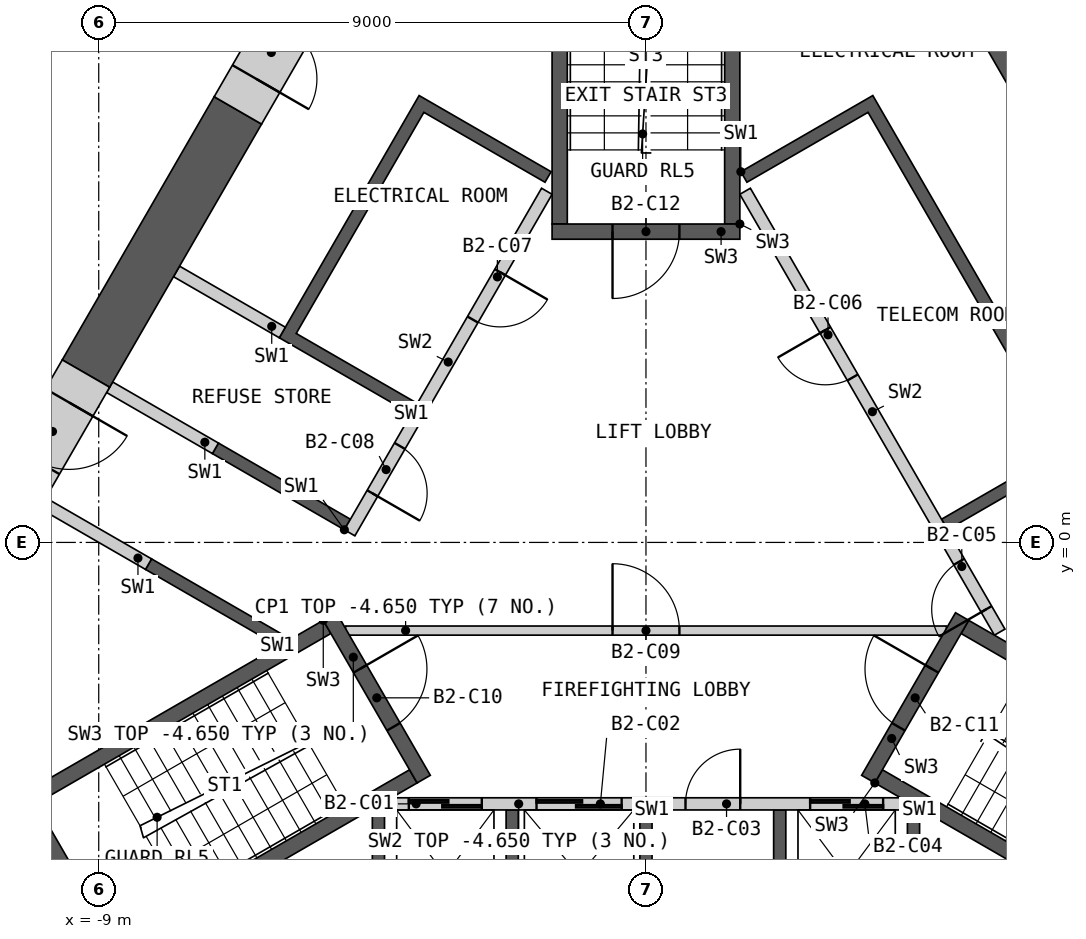
"""IFC4 building model, lengths in metres.
Left out: names, types, materials, properties, quantities, classifications, styles, units other than length and angle.
Written with IfcOpenShell. Run it as: python <this file> out.ifc"""

import sys

from ifc_helpers import new_model, si_unit, direction, frame, frame_2d, origin, place, context, subcontext, project, spatial, polyline, rectangle, outline, extrude, element, fill, save


model = new_model("IFC4")
c1 = context("Model", 3, precision=1e-05, world=origin(), true_north=direction((0.0, 1.0)))
c2 = subcontext(c1, "Body", "Model", "MODEL_VIEW")
j1 = project(units=[si_unit("LENGTHUNIT", "METRE"), si_unit("PLANEANGLEUNIT", "RADIAN")], contexts=[c1])
p1 = place(None, origin())
s1 = spatial("IfcSite", under=j1, at=p1, CompositionType="ELEMENT")
p2 = place(p1, origin())
s2 = spatial("IfcBuilding", under=s1, at=p2, CompositionType="ELEMENT")
p3 = place(p2, frame((0.0, 0.0, -8.4)))
s3 = spatial("IfcBuildingStorey", under=s2, at=p3, CompositionType="ELEMENT", Elevation=-8.4)
p4 = place(p3, frame((-6.74, 32.759, 0.0), z_axis=(0.0, 0.0, 1.0), x_axis=(-0.500000005698, -0.866025400495, 0.0)))
e1 = element("IfcWall", 1, at=p4, inside=s3, PredefinedType="SOLIDWALL", context=c2, shape_type="SweptSolid", body=[
    extrude(rectangle(XDim=50.0, YDim=0.6, at=frame_2d((25.0, 0.0))), origin(), (0.0, 0.0, 1.0), 3.75),
])
p5 = place(p3, origin())
e2 = element("IfcWall", 2, at=p5, inside=s3, PredefinedType="SHEAR", context=c2, shape_type="SweptSolid", body=[
    extrude(outline(polyline([(4.5, -4.4), (4.5, -6.906), (2.1, -6.906), (2.1, -4.4), (2.3, -4.4), (2.3, -6.7), (4.3, -6.7), (4.3, -4.4), (4.5, -4.4)])), origin(), (0.0, 0.0, 1.0), 3.75),
])
p6 = place(p3, origin())
e3 = element("IfcWall", 3, at=p6, inside=s3, PredefinedType="SHEAR", context=c2, shape_type="SweptSolid", body=[
    extrude(outline(polyline([(0.1, -4.4), (0.1, -6.906), (-4.5, -6.906), (-4.5, -4.4), (-4.3, -4.4), (-4.3, -6.7), (-2.3, -6.7), (-2.3, -4.4), (-2.1, -4.4), (-2.1, -6.7), (-0.1, -6.7), (-0.1, -4.4), (0.1, -4.4)])), origin(), (0.0, 0.0, 1.0), 3.75),
])
p7 = place(p3, frame((-4.187, -4.3, 0.0), z_axis=(0.0, 0.0, 1.0), x_axis=(1.0, 0.0, 0.0)))
e4 = element("IfcWall", 4, at=p7, inside=s3, PredefinedType="SOLIDWALL", context=c2, shape_type="SweptSolid", body=[
    extrude(rectangle(XDim=8.373, YDim=0.2, at=frame_2d((4.187, 0.0))), origin(), (0.0, 0.0, 1.0), 3.75),
])
p8 = place(p7, frame((0.287, 0.0, 0.0)))
e5 = element("IfcOpeningElement", 5, at=p8, cuts=e4, PredefinedType="OPENING", context=c2, shape_type="SweptSolid", body=[
    extrude(rectangle(XDim=1.2, YDim=2.1, at=frame_2d((0.6, 1.05))), frame((0.0, 0.11, 0.0), z_axis=(0.0, -1.0, 0.0), x_axis=(1.0, 0.0, 0.0)), (0.0, 0.0, 1.0), 0.22),
])
p9 = place(p7, frame((2.387, 0.0, 0.0)))
e6 = element("IfcOpeningElement", 6, at=p9, cuts=e4, PredefinedType="OPENING", context=c2, shape_type="SweptSolid", body=[
    extrude(rectangle(XDim=1.4, YDim=2.1, at=frame_2d((0.7, 1.05))), frame((0.0, 0.11, 0.0), z_axis=(0.0, -1.0, 0.0), x_axis=(1.0, 0.0, 0.0)), (0.0, 0.0, 1.0), 0.22),
])
p10 = place(p7, frame((4.837, 0.0, 0.0)))
e7 = element("IfcOpeningElement", 7, at=p10, cuts=e4, PredefinedType="OPENING", context=c2, shape_type="SweptSolid", body=[
    extrude(rectangle(XDim=0.9, YDim=2.1, at=frame_2d((0.45, 1.05))), frame((0.0, 0.11, 0.0), z_axis=(0.0, -1.0, 0.0), x_axis=(1.0, 0.0, 0.0)), (0.0, 0.0, 1.0), 0.22),
])
p11 = place(p7, frame((6.887, 0.0, 0.0)))
e8 = element("IfcOpeningElement", 8, at=p11, cuts=e4, PredefinedType="OPENING", context=c2, shape_type="SweptSolid", body=[
    extrude(rectangle(XDim=1.2, YDim=2.1, at=frame_2d((0.6, 1.05))), frame((0.0, 0.11, 0.0), z_axis=(0.0, -1.0, 0.0), x_axis=(1.0, 0.0, 0.0)), (0.0, 0.0, 1.0), 0.22),
])
p12 = place(p3, origin())
e9 = element("IfcWall", 9, at=p12, inside=s3, PredefinedType="SHEAR", context=c2, shape_type="SweptSolid", body=[
    extrude(outline(polyline([(1.561, 6.097), (3.731, 7.35), (7.131, 1.461), (4.96, 0.208), (4.861, 0.381), (6.852, 1.531), (3.652, 7.074), (1.66, 5.924), (1.561, 6.097)])), origin(), (0.0, 0.0, 1.0), 3.75),
])
p13 = place(p3, frame((5.817, -1.476, 0.0), z_axis=(0.0, 0.0, 1.0), x_axis=(-0.500002616675, 0.866023893041, 0.0)))
e10 = element("IfcWall", 10, at=p13, inside=s3, PredefinedType="SOLIDWALL", context=c2, shape_type="SweptSolid", body=[
    extrude(rectangle(XDim=8.373, YDim=0.2, at=frame_2d((4.187, 0.0))), origin(), (0.0, 0.0, 1.0), 3.75),
])
p14 = place(p13, frame((0.437, 0.0, 0.0)))
e11 = element("IfcOpeningElement", 11, at=p14, cuts=e10, PredefinedType="OPENING", context=c2, shape_type="SweptSolid", body=[
    extrude(rectangle(XDim=0.9, YDim=2.1, at=frame_2d((0.45, 1.05))), frame((0.0, 0.11, 0.0), z_axis=(0.0, -1.0, 0.0), x_axis=(1.0, 0.0, 0.0)), (0.0, 0.0, 1.0), 0.22),
])
p15 = place(p13, frame((4.837, 0.0, 0.0)))
e12 = element("IfcOpeningElement", 12, at=p15, cuts=e10, PredefinedType="OPENING", context=c2, shape_type="SweptSolid", body=[
    extrude(rectangle(XDim=0.9, YDim=2.1, at=frame_2d((0.45, 1.05))), frame((0.0, 0.11, 0.0), z_axis=(0.0, -1.0, 0.0), x_axis=(1.0, 0.0, 0.0)), (0.0, 0.0, 1.0), 0.22),
])
p16 = place(p3, origin())
e13 = element("IfcWall", 13, at=p16, inside=s3, PredefinedType="SHEAR", context=c2, shape_type="SweptSolid", body=[
    extrude(outline(polyline([(-6.061, -1.697), (-8.231, -0.444), (-8.131, -0.271), (-5.96, -1.524), (-6.061, -1.697)])), origin(), (0.0, 0.0, 1.0), 3.75),
])
p17 = place(p3, origin())
e14 = element("IfcWall", 14, at=p17, inside=s3, PredefinedType="SHEAR", context=c2, shape_type="SweptSolid", body=[
    extrude(outline(polyline([(-4.96, 0.208), (-7.131, 1.461), (-7.031, 1.634), (-4.861, 0.381), (-4.96, 0.208)])), origin(), (0.0, 0.0, 1.0), 3.75),
])
p18 = place(p3, origin())
e15 = element("IfcWall", 15, at=p18, inside=s3, PredefinedType="SHEAR", context=c2, shape_type="SweptSolid", body=[
    extrude(outline(polyline([(-3.861, 2.113), (-6.031, 3.366), (-3.731, 7.35), (-1.561, 6.097), (-1.66, 5.924), (-3.652, 7.074), (-5.752, 3.437), (-3.76, 2.287), (-3.861, 2.113)])), origin(), (0.0, 0.0, 1.0), 3.75),
])
p19 = place(p3, frame((-1.631, 5.776, 0.0), z_axis=(0.0, 0.0, 1.0), x_axis=(-0.499992876559, -0.866029516466, 0.0)))
e16 = element("IfcWall", 16, at=p19, inside=s3, PredefinedType="SOLIDWALL", context=c2, shape_type="SweptSolid", body=[
    extrude(rectangle(XDim=6.486, YDim=0.2, at=frame_2d((3.243, 0.0))), origin(), (0.0, 0.0, 1.0), 3.75),
])
p20 = place(p19, frame((1.537, 0.0, 0.0)))
e17 = element("IfcOpeningElement", 17, at=p20, cuts=e16, PredefinedType="OPENING", context=c2, shape_type="SweptSolid", body=[
    extrude(rectangle(XDim=0.9, YDim=2.1, at=frame_2d((0.45, 1.05))), frame((0.0, 0.11, 0.0), z_axis=(0.0, -1.0, 0.0), x_axis=(1.0, 0.0, 0.0)), (0.0, 0.0, 1.0), 0.22),
])
p21 = place(p19, frame((4.837, 0.0, 0.0)))
e18 = element("IfcOpeningElement", 18, at=p21, cuts=e16, PredefinedType="OPENING", context=c2, shape_type="SweptSolid", body=[
    extrude(rectangle(XDim=0.9, YDim=2.1, at=frame_2d((0.45, 1.05))), frame((0.0, 0.11, 0.0), z_axis=(0.0, -1.0, 0.0), x_axis=(1.0, 0.0, 0.0)), (0.0, 0.0, 1.0), 0.22),
])
p22 = place(p3, frame((-5.981, 3.453, 0.0), z_axis=(0.0, 0.0, 1.0), x_axis=(-0.866013584312, 0.500020471368, 0.0)))
e19 = element("IfcWall", 19, at=p22, inside=s3, PredefinedType="SHEAR", context=c2, shape_type="SweptSolid", body=[
    extrude(rectangle(XDim=2.009, YDim=0.2, at=frame_2d((1.005, 0.0))), origin(), (0.0, 0.0, 1.0), 3.75),
])
p23 = place(p3, frame((-7.081, 1.548, 0.0), z_axis=(0.0, 0.0, 1.0), x_axis=(-0.865983199114, 0.50007309351, 0.0)))
e20 = element("IfcWall", 20, at=p23, inside=s3, PredefinedType="SHEAR", context=c2, shape_type="SweptSolid", body=[
    extrude(rectangle(XDim=2.009, YDim=0.2, at=frame_2d((1.004, 0.0))), origin(), (0.0, 0.0, 1.0), 3.75),
])
p24 = place(p3, frame((-8.181, -0.357, 0.0), z_axis=(0.0, 0.0, 1.0), x_axis=(-0.866035824272, 0.499981950752, 0.0)))
e21 = element("IfcWall", 21, at=p24, inside=s3, PredefinedType="SHEAR", context=c2, shape_type="SweptSolid", body=[
    extrude(rectangle(XDim=2.009, YDim=0.2, at=frame_2d((1.004, 0.0))), origin(), (0.0, 0.0, 1.0), 3.75),
])
p25 = place(p3, frame((-4.941, -1.45, 0.0), z_axis=(0.0, 0.0, 1.0), x_axis=(1.0, 0.0, 0.0)))
e22 = element("IfcWall", 22, at=p25, inside=s3, PredefinedType="PARTITIONING", context=c2, shape_type="SweptSolid", body=[
    extrude(rectangle(XDim=9.882, YDim=0.15, at=frame_2d((4.941, 0.0))), origin(), (0.0, 0.0, 1.0), 3.75),
])
p26 = place(p25, frame((4.391, 0.0, 0.0)))
e23 = element("IfcOpeningElement", 23, at=p26, cuts=e22, PredefinedType="OPENING", context=c2, shape_type="SweptSolid", body=[
    extrude(rectangle(XDim=1.1, YDim=2.1, at=frame_2d((0.55, 1.05))), frame((0.0, 0.085, 0.0), z_axis=(0.0, -1.0, 0.0), x_axis=(1.0, 0.0, 0.0)), (0.0, 0.0, 1.0), 0.17),
])
p27 = place(p3, origin())
e24 = element("IfcWall", 24, at=p27, inside=s3, PredefinedType="SHEAR", context=c2, shape_type="SweptSolid", body=[
    extrude(outline(polyline([(-5.307, -1.281), (-10.374, -4.206), (-10.032, -4.298), (-5.182, -1.498), (-5.307, -1.281)])), origin(), (0.0, 0.0, 1.0), 3.75),
])
p28 = place(p3, origin())
e25 = element("IfcWall", 25, at=p28, inside=s3, PredefinedType="SHEAR", context=c2, shape_type="SweptSolid", body=[
    extrude(outline(polyline([(-10.374, -4.206), (-8.83, -6.881), (-8.738, -6.539), (-10.032, -4.298), (-10.374, -4.206)])), origin(), (0.0, 0.0, 1.0), 3.75),
])
p29 = place(p3, origin())
e26 = element("IfcWall", 26, at=p29, inside=s3, PredefinedType="SHEAR", context=c2, shape_type="SweptSolid", body=[
    extrude(outline(polyline([(-8.738, -6.539), (-8.83, -6.881), (-3.763, -3.956), (-3.888, -3.739), (-8.738, -6.539)])), origin(), (0.0, 0.0, 1.0), 3.75),
])
p30 = place(p3, frame((-5.199, -1.219, 0.0), z_axis=(0.0, 0.0, 1.0), x_axis=(0.499982516597, -0.866035497597, 0.0)))
e27 = element("IfcWall", 27, at=p30, inside=s3, PredefinedType="SHEAR", context=c2, shape_type="SweptSolid", body=[
    extrude(rectangle(XDim=3.088, YDim=0.25, at=frame_2d((1.544, 0.0))), origin(), (0.0, 0.0, 1.0), 3.75),
])
p31 = place(p30, frame((0.994, 0.0, 0.0)))
e28 = element("IfcOpeningElement", 28, at=p31, cuts=e27, PredefinedType="OPENING", context=c2, shape_type="SweptSolid", body=[
    extrude(rectangle(XDim=1.1, YDim=2.1, at=frame_2d((0.55, 1.05))), frame((0.0, 0.135, 0.0), z_axis=(0.0, -1.0, 0.0), x_axis=(1.0, 0.0, 0.0)), (0.0, 0.0, 1.0), 0.27),
])
p32 = place(p3, origin())
e29 = element("IfcWall", 29, at=p32, inside=s3, PredefinedType="SHEAR", context=c2, shape_type="SweptSolid", body=[
    extrude(outline(polyline([(3.763, -3.956), (8.83, -6.881), (8.738, -6.539), (3.888, -3.739), (3.763, -3.956)])), origin(), (0.0, 0.0, 1.0), 3.75),
])
p33 = place(p3, origin())
e30 = element("IfcWall", 30, at=p33, inside=s3, PredefinedType="SHEAR", context=c2, shape_type="SweptSolid", body=[
    extrude(outline(polyline([(10.032, -4.298), (10.374, -4.206), (5.307, -1.281), (5.182, -1.498), (10.032, -4.298)])), origin(), (0.0, 0.0, 1.0), 3.75),
])
p34 = place(p3, frame((3.655, -3.893, 0.0), z_axis=(0.0, 0.0, 1.0), x_axis=(0.499982516597, 0.866035497597, 0.0)))
e31 = element("IfcWall", 31, at=p34, inside=s3, PredefinedType="SHEAR", context=c2, shape_type="SweptSolid", body=[
    extrude(rectangle(XDim=3.088, YDim=0.25, at=frame_2d((1.544, 0.0))), origin(), (0.0, 0.0, 1.0), 3.75),
])
p35 = place(p34, frame((0.994, 0.0, 0.0)))
e32 = element("IfcOpeningElement", 32, at=p35, cuts=e31, PredefinedType="OPENING", context=c2, shape_type="SweptSolid", body=[
    extrude(rectangle(XDim=1.1, YDim=2.1, at=frame_2d((0.55, 1.05))), frame((0.0, 0.135, 0.0), z_axis=(0.0, -1.0, 0.0), x_axis=(1.0, 0.0, 0.0)), (0.0, 0.0, 1.0), 0.27),
])
p36 = place(p3, origin())
e33 = element("IfcWall", 33, at=p36, inside=s3, PredefinedType="SHEAR", context=c2, shape_type="SweptSolid", body=[
    extrude(outline(polyline([(1.544, 5.237), (1.544, 11.087), (1.294, 10.837), (1.294, 5.237), (1.544, 5.237)])), origin(), (0.0, 0.0, 1.0), 3.75),
])
p37 = place(p3, origin())
e34 = element("IfcWall", 34, at=p37, inside=s3, PredefinedType="SHEAR", context=c2, shape_type="SweptSolid", body=[
    extrude(outline(polyline([(-1.294, 10.837), (-1.544, 11.087), (-1.544, 5.237), (-1.294, 5.237), (-1.294, 10.837)])), origin(), (0.0, 0.0, 1.0), 3.75),
])
p38 = place(p3, frame((1.544, 5.112, 0.0), z_axis=(0.0, 0.0, 1.0), x_axis=(-1.0, 0.0, 0.0)))
e35 = element("IfcWall", 35, at=p38, inside=s3, PredefinedType="SHEAR", context=c2, shape_type="SweptSolid", body=[
    extrude(rectangle(XDim=3.088, YDim=0.25, at=frame_2d((1.544, 0.0))), origin(), (0.0, 0.0, 1.0), 3.75),
])
p39 = place(p38, frame((0.994, 0.0, 0.0)))
e36 = element("IfcOpeningElement", 36, at=p39, cuts=e35, PredefinedType="OPENING", context=c2, shape_type="SweptSolid", body=[
    extrude(rectangle(XDim=1.1, YDim=2.1, at=frame_2d((0.55, 1.05))), frame((0.0, 0.135, 0.0), z_axis=(0.0, -1.0, 0.0), x_axis=(1.0, 0.0, 0.0)), (0.0, 0.0, 1.0), 0.27),
])
p40 = place(p3, frame((6.436, 7.582, 0.0), z_axis=(0.0, 0.0, 1.0), x_axis=(-0.500003364394, 0.866023461342, 0.0)))
e37 = element("IfcWall", 37, at=p40, inside=s3, PredefinedType="SHEAR", context=c2, shape_type="SweptSolid", body=[
    extrude(rectangle(XDim=6.646, YDim=0.9, at=frame_2d((3.323, 0.0))), origin(), (0.0, 0.0, 1.0), 3.75),
])
p41 = place(p3, frame((-6.711, 7.105, 0.0), z_axis=(0.0, 0.0, 1.0), x_axis=(-0.499969117767, -0.866043232916, 0.0)))
e38 = element("IfcWall", 38, at=p41, inside=s3, PredefinedType="SHEAR", context=c2, shape_type="SweptSolid", body=[
    extrude(rectangle(XDim=4.998, YDim=0.9, at=frame_2d((2.499, 0.0))), origin(), (0.0, 0.0, 1.0), 3.75),
])
p42 = place(p3, frame((-5.611, 9.011, 0.0), z_axis=(0.0, 0.0, 1.0), x_axis=(-0.50002983664, -0.866008176907, 0.0)))
e39 = element("IfcWall", 39, at=p42, inside=s3, PredefinedType="SHEAR", context=c2, shape_type="SweptSolid", body=[
    extrude(rectangle(XDim=2.2, YDim=0.9, at=frame_2d((1.1, 0.0))), origin(), (0.0, 0.0, 1.0), 3.75),
])
p43 = place(p42, frame((0.6, 0.0, 0.0)))
e40 = element("IfcOpeningElement", 40, at=p43, cuts=e39, PredefinedType="OPENING", context=c2, shape_type="SweptSolid", body=[
    extrude(rectangle(XDim=1.0, YDim=2.1, at=frame_2d((0.5, 1.05))), frame((0.0, 0.46, 0.0), z_axis=(0.0, -1.0, 0.0), x_axis=(1.0, 0.0, 0.0)), (0.0, 0.0, 1.0), 0.92),
])
p44 = place(p3, frame((-9.21, 2.777, 0.0), z_axis=(0.0, 0.0, 1.0), x_axis=(-0.500077893725, -0.86598042715, 0.0)))
e41 = element("IfcWall", 41, at=p44, inside=s3, PredefinedType="SHEAR", context=c2, shape_type="SweptSolid", body=[
    extrude(rectangle(XDim=2.2, YDim=0.9, at=frame_2d((1.1, 0.0))), origin(), (0.0, 0.0, 1.0), 3.75),
])
p45 = place(p44, frame((0.55, 0.0, 0.0)))
e42 = element("IfcOpeningElement", 42, at=p45, cuts=e41, PredefinedType="OPENING", context=c2, shape_type="SweptSolid", body=[
    extrude(rectangle(XDim=1.1, YDim=2.1, at=frame_2d((0.55, 1.05))), frame((0.0, 0.46, 0.0), z_axis=(0.0, -1.0, 0.0), x_axis=(1.0, 0.0, 0.0)), (0.0, 0.0, 1.0), 0.92),
])
p46 = place(p3, frame((-2.817, 24.72, 0.0), z_axis=(0.0, 0.0, 1.0), x_axis=(-0.500000572924, -0.866025073006, 0.0)))
e43 = element("IfcWall", 43, at=p46, inside=s3, PredefinedType="SHEAR", context=c2, shape_type="SweptSolid", body=[
    extrude(outline(polyline([(0.0, 0.0), (22.467, 0.0), (22.467, 0.3), (3.0, 3.549), (3.0, 3.544), (0.0, 3.799), (0.0, 0.0)])), frame((0.0, 0.15, 0.0), z_axis=(0.0, -1.0, 0.0), x_axis=(1.0, 0.0, 0.0)), (0.0, 0.0, 1.0), 0.3),
])
p47 = place(p3, frame((-7.753, 27.571, 0.0), z_axis=(0.0, 0.0, 1.0), x_axis=(-0.500004017478, -0.86602308428, 0.0)))
e44 = element("IfcWall", 44, at=p47, inside=s3, PredefinedType="SHEAR", context=c2, shape_type="SweptSolid", body=[
    extrude(outline(polyline([(0.0, 0.0), (22.467, 0.0), (22.467, 0.3), (3.0, 3.549), (3.0, 3.544), (0.0, 3.799), (0.0, 0.0)])), frame((0.0, 0.15, 0.0), z_axis=(0.0, -1.0, 0.0), x_axis=(1.0, 0.0, 0.0)), (0.0, 0.0, 1.0), 0.3),
])
p48 = place(p8, origin())
e45 = element("IfcDoor", 45, at=p48, inside=s3, OperationType="SLIDING_TO_LEFT", PredefinedType="DOOR", context=c2, shape_type="SweptSolid", body=[
    extrude(rectangle(XDim=1.2, YDim=2.1, at=frame_2d((0.6, 1.05))), frame((0.0, 0.025, 0.0), z_axis=(0.0, -1.0, 0.0), x_axis=(1.0, 0.0, 0.0)), (0.0, 0.0, 1.0), 0.05),
])
fill(e5, e45)
p49 = place(p9, origin())
e46 = element("IfcDoor", 46, at=p49, inside=s3, OperationType="SLIDING_TO_LEFT", PredefinedType="DOOR", context=c2, shape_type="SweptSolid", body=[
    extrude(rectangle(XDim=1.4, YDim=2.1, at=frame_2d((0.7, 1.05))), frame((0.0, 0.025, 0.0), z_axis=(0.0, -1.0, 0.0), x_axis=(1.0, 0.0, 0.0)), (0.0, 0.0, 1.0), 0.05),
])
fill(e6, e46)
p50 = place(p10, origin())
e47 = element("IfcDoor", 47, at=p50, inside=s3, OperationType="SINGLE_SWING_RIGHT", PredefinedType="DOOR", context=c2, shape_type="SweptSolid", body=[
    extrude(rectangle(XDim=0.9, YDim=2.1, at=frame_2d((0.45, 1.05))), frame((0.0, 0.025, 0.0), z_axis=(0.0, -1.0, 0.0), x_axis=(1.0, 0.0, 0.0)), (0.0, 0.0, 1.0), 0.05),
])
fill(e7, e47)
p51 = place(p11, origin())
e48 = element("IfcDoor", 48, at=p51, inside=s3, OperationType="SLIDING_TO_LEFT", PredefinedType="DOOR", context=c2, shape_type="SweptSolid", body=[
    extrude(rectangle(XDim=1.2, YDim=2.1, at=frame_2d((0.6, 1.05))), frame((0.0, 0.025, 0.0), z_axis=(0.0, -1.0, 0.0), x_axis=(1.0, 0.0, 0.0)), (0.0, 0.0, 1.0), 0.05),
])
fill(e8, e48)
p52 = place(p14, origin())
e49 = element("IfcDoor", 49, at=p52, inside=s3, OperationType="SINGLE_SWING_LEFT", PredefinedType="DOOR", context=c2, shape_type="SweptSolid", body=[
    extrude(rectangle(XDim=0.9, YDim=2.1, at=frame_2d((0.45, 1.05))), frame((0.0, 0.025, 0.0), z_axis=(0.0, -1.0, 0.0), x_axis=(1.0, 0.0, 0.0)), (0.0, 0.0, 1.0), 0.05),
])
fill(e11, e49)
p53 = place(p15, origin())
e50 = element("IfcDoor", 50, at=p53, inside=s3, OperationType="SINGLE_SWING_RIGHT", PredefinedType="DOOR", context=c2, shape_type="SweptSolid", body=[
    extrude(rectangle(XDim=0.9, YDim=2.1, at=frame_2d((0.45, 1.05))), frame((0.0, 0.025, 0.0), z_axis=(0.0, -1.0, 0.0), x_axis=(1.0, 0.0, 0.0)), (0.0, 0.0, 1.0), 0.05),
])
fill(e12, e50)
p54 = place(p20, origin())
e51 = element("IfcDoor", 51, at=p54, inside=s3, OperationType="SINGLE_SWING_LEFT", PredefinedType="DOOR", context=c2, shape_type="SweptSolid", body=[
    extrude(rectangle(XDim=0.9, YDim=2.1, at=frame_2d((0.45, 1.05))), frame((0.0, 0.025, 0.0), z_axis=(0.0, -1.0, 0.0), x_axis=(1.0, 0.0, 0.0)), (0.0, 0.0, 1.0), 0.05),
])
fill(e17, e51)
p55 = place(p21, origin())
e52 = element("IfcDoor", 52, at=p55, inside=s3, OperationType="SINGLE_SWING_RIGHT", PredefinedType="DOOR", context=c2, shape_type="SweptSolid", body=[
    extrude(rectangle(XDim=0.9, YDim=2.1, at=frame_2d((0.45, 1.05))), frame((0.0, 0.025, 0.0), z_axis=(0.0, -1.0, 0.0), x_axis=(1.0, 0.0, 0.0)), (0.0, 0.0, 1.0), 0.05),
])
fill(e18, e52)
p56 = place(p26, origin())
e53 = element("IfcDoor", 53, at=p56, inside=s3, OperationType="SINGLE_SWING_LEFT", PredefinedType="DOOR", context=c2, shape_type="SweptSolid", body=[
    extrude(rectangle(XDim=1.1, YDim=2.1, at=frame_2d((0.55, 1.05))), frame((0.0, 0.025, 0.0), z_axis=(0.0, -1.0, 0.0), x_axis=(1.0, 0.0, 0.0)), (0.0, 0.0, 1.0), 0.05),
])
fill(e23, e53)
p57 = place(p31, origin())
e54 = element("IfcDoor", 54, at=p57, inside=s3, OperationType="SINGLE_SWING_LEFT", PredefinedType="DOOR", context=c2, shape_type="SweptSolid", body=[
    extrude(rectangle(XDim=1.1, YDim=2.1, at=frame_2d((0.55, 1.05))), frame((0.0, 0.025, 0.0), z_axis=(0.0, -1.0, 0.0), x_axis=(1.0, 0.0, 0.0)), (0.0, 0.0, 1.0), 0.05),
])
fill(e28, e54)
p58 = place(p35, origin())
e55 = element("IfcDoor", 55, at=p58, inside=s3, OperationType="SINGLE_SWING_RIGHT", PredefinedType="DOOR", context=c2, shape_type="SweptSolid", body=[
    extrude(rectangle(XDim=1.1, YDim=2.1, at=frame_2d((0.55, 1.05))), frame((0.0, 0.025, 0.0), z_axis=(0.0, -1.0, 0.0), x_axis=(1.0, 0.0, 0.0)), (0.0, 0.0, 1.0), 0.05),
])
fill(e32, e55)
p59 = place(p39, origin())
e56 = element("IfcDoor", 56, at=p59, inside=s3, OperationType="SINGLE_SWING_RIGHT", PredefinedType="DOOR", context=c2, shape_type="SweptSolid", body=[
    extrude(rectangle(XDim=1.1, YDim=2.1, at=frame_2d((0.55, 1.05))), frame((0.0, 0.025, 0.0), z_axis=(0.0, -1.0, 0.0), x_axis=(1.0, 0.0, 0.0)), (0.0, 0.0, 1.0), 0.05),
])
fill(e36, e56)
p60 = place(p43, origin())
e57 = element("IfcDoor", 57, at=p60, inside=s3, OperationType="SINGLE_SWING_RIGHT", PredefinedType="DOOR", context=c2, shape_type="SweptSolid", body=[
    extrude(rectangle(XDim=1.0, YDim=2.1, at=frame_2d((0.5, 1.05))), frame((0.0, 0.205, 0.0), z_axis=(0.0, -1.0, 0.0), x_axis=(1.0, 0.0, 0.0)), (0.0, 0.0, 1.0), 0.05),
])
fill(e40, e57)
p61 = place(p45, origin())
e58 = element("IfcDoor", 58, at=p61, inside=s3, OperationType="SINGLE_SWING_LEFT", PredefinedType="DOOR", context=c2, shape_type="SweptSolid", body=[
    extrude(rectangle(XDim=1.1, YDim=2.1, at=frame_2d((0.55, 1.05))), frame((0.0, 0.205, 0.0), z_axis=(0.0, -1.0, 0.0), x_axis=(1.0, 0.0, 0.0)), (0.0, 0.0, 1.0), 0.05),
])
fill(e42, e58)
save(model, sys.argv[1])
